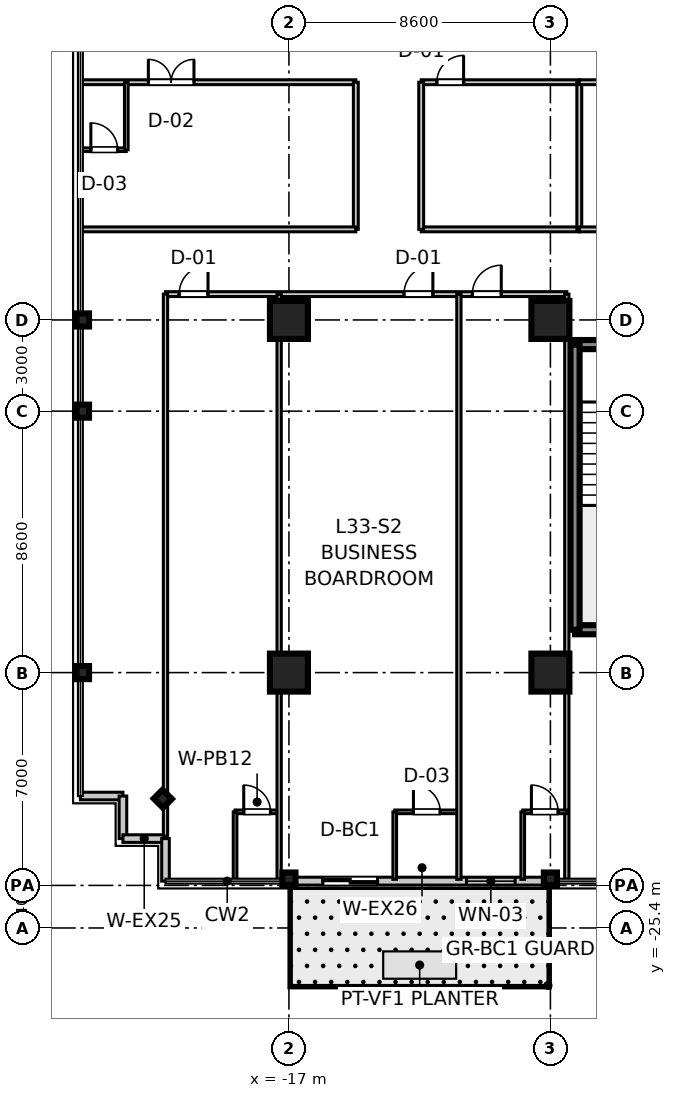
"""IFC4 building model, lengths in metres.
Left out: names, types, materials, properties, quantities, classifications, styles, units other than length and angle.
Written with IfcOpenShell. Run it as: python <this file> out.ifc"""

import sys

from ifc_helpers import new_model, si_unit, direction, frame, frame_2d, origin, origin_2d, place, context, subcontext, project, spatial, rectangle, i_section, extrude, source, transform, mapped, element, fill, save


model = new_model("IFC4")
c1 = context("Model", 3, precision=1e-05, world=origin(), true_north=direction((0.0, 1.0)))
c2 = subcontext(c1, "Body", "Model", "MODEL_VIEW")
j1 = project(units=[si_unit("LENGTHUNIT", "METRE"), si_unit("PLANEANGLEUNIT", "RADIAN")], contexts=[c1])
p1 = place(None, origin())
s1 = spatial("IfcSite", under=j1, at=p1, CompositionType="ELEMENT")
p2 = place(p1, origin())
s2 = spatial("IfcBuilding", under=s1, at=p2, CompositionType="ELEMENT")
p3 = place(p2, frame((0.0, 0.0, 132.1)))
s3 = spatial("IfcBuildingStorey", under=s2, at=p3, CompositionType="ELEMENT", Elevation=132.1)
m1 = source(origin(), c2, "Body", "SweptSolid", [
    extrude(rectangle(XDim=1.25, YDim=1.25, at=origin_2d()), origin(), (0.0, 0.0, 1.0), 3.605),
])
for number, where, z_axis, x_axis in (
    (1, (-17.0, -17.0, 0.0), (0.0, 0.0, 1.0), (1.0, 0.0, 0.0)),
    (2, (-17.0, -5.4, 0.0), (0.0, 0.0, 1.0), (1.0, 0.0, 0.0)),
    (3, (-8.4, -17.0, 0.0), (0.0, 0.0, 1.0), (1.0, 0.0, 0.0)),
    (4, (-8.4, -5.4, 0.0), (0.0, 0.0, 1.0), (1.0, 0.0, 0.0)),
):
    element("IfcColumn", number, at=place(p3, frame(where, z_axis=z_axis, x_axis=x_axis)), inside=s3, PredefinedType="COLUMN", context=c2, shape_type="MappedRepresentation", body=[
        mapped(m1, transform((0.0, 0.0, 0.0), scale=1.0)),
    ])
m2 = source(origin(), c2, "Body", "SweptSolid", [
    extrude(i_section(OverallWidth=0.409, OverallDepth=0.43, WebThickness=0.021, FlangeThickness=0.034, at=origin_2d()), origin(), (0.0, 0.0, 1.0), 3.605),
])
for number, where, z_axis, x_axis in (
    (5, (-23.78, -17.0, 0.0), (0.0, 0.0, 1.0), (1.0, 0.0, 0.0)),
    (6, (-23.78, -8.4, 0.0), (0.0, 0.0, 1.0), (1.0, 0.0, 0.0)),
    (7, (-23.78, -5.4, 0.0), (0.0, 0.0, 1.0), (1.0, 0.0, 0.0)),
    (8, (-17.0, -23.78, 0.0), (0.0, 0.0, 1.0), (0.0, 1.0, 0.0)),
    (9, (-8.4, -23.78, 0.0), (0.0, 0.0, 1.0), (0.0, 1.0, 0.0)),
    (10, (-21.15, -21.15, 0.0), (0.0, 0.0, 1.0), (0.707, 0.707, 0.0)),
):
    element("IfcColumn", number, at=place(p3, frame(where, z_axis=z_axis, x_axis=x_axis)), inside=s3, PredefinedType="COLUMN", context=c2, shape_type="MappedRepresentation", body=[
        mapped(m2, transform((0.0, 0.0, 0.0), scale=1.0)),
    ])
m3 = source(origin(), c2, "Body", "SweptSolid", [
    extrude(rectangle(XDim=3.98, YDim=0.3, at=frame_2d((1.99, 0.0))), origin(), (0.0, 0.0, 1.0), 3.38),
])
p4 = place(p3, frame((-7.59, -15.59, 0.0), z_axis=(0.0, 0.0, 1.0), x_axis=(1.0, 0.0, 0.0)))
e11 = element("IfcWall", 11, at=p4, inside=s3, PredefinedType="SHEAR", context=c2, shape_type="MappedRepresentation", body=[
    mapped(m3, transform((0.0, 0.0, 0.0), scale=1.0)),
])
p5 = place(p3, frame((-7.59, -6.21, 0.0), z_axis=(0.0, 0.0, 1.0), x_axis=(1.0, 0.0, 0.0)))
e12 = element("IfcWall", 12, at=p5, inside=s3, PredefinedType="SHEAR", context=c2, shape_type="MappedRepresentation", body=[
    mapped(m3, transform((0.0, 0.0, 0.0), scale=1.0)),
])
p6 = place(p5, frame((1.44, 0.0, 0.0)))
e13 = element("IfcOpeningElement", 13, at=p6, cuts=e12, PredefinedType="OPENING", context=c2, shape_type="SweptSolid", body=[
    extrude(rectangle(XDim=1.1, YDim=2.15, at=frame_2d((0.55, 1.075))), frame((0.0, 0.16, 0.0), z_axis=(0.0, -1.0, 0.0), x_axis=(1.0, 0.0, 0.0)), (0.0, 0.0, 1.0), 0.32),
])
m4 = source(origin(), c2, "Body", "SweptSolid", [
    extrude(rectangle(XDim=9.38, YDim=0.3, at=frame_2d((4.69, 0.0))), origin(), (0.0, 0.0, 1.0), 3.38),
])
p7 = place(p3, frame((-7.59, -15.59, 0.0), z_axis=(0.0, 0.0, 1.0), x_axis=(0.0, 1.0, 0.0)))
e14 = element("IfcWall", 14, at=p7, inside=s3, PredefinedType="SHEAR", context=c2, shape_type="MappedRepresentation", body=[
    mapped(m4, transform((0.0, 0.0, 0.0), scale=1.0)),
])
m5 = source(origin(), c2, "Body", "SweptSolid", [
    extrude(rectangle(XDim=1.4, YDim=0.25, at=frame_2d((0.7, 0.0))), origin(), (0.0, 0.0, 1.0), 3.38),
])
p8 = place(p3, frame((-23.86, -21.06, 0.0), z_axis=(0.0, 0.0, 1.0), x_axis=(1.0, 0.0, 0.0)))
e15 = element("IfcWall", 15, at=p8, inside=s3, PredefinedType="STANDARD", context=c2, shape_type="MappedRepresentation", body=[
    mapped(m5, transform((0.0, 0.0, 0.0), scale=1.0)),
])
m6 = source(origin(), c2, "Body", "SweptSolid", [
    extrude(rectangle(XDim=1.4, YDim=0.25, at=frame_2d((0.7, 0.0))), origin(), (0.0, 0.0, 1.0), 3.38),
])
for number, where, z_axis, x_axis in (
    (16, (-22.46, -22.46, 0.0), (0.0, 0.0, 1.0), (0.0, 1.0, 0.0)),
    (17, (-22.46, -22.46, 0.0), (0.0, 0.0, 1.0), (1.0, 0.0, 0.0)),
):
    element("IfcWall", number, at=place(p3, frame(where, z_axis=z_axis, x_axis=x_axis)), inside=s3, PredefinedType="STANDARD", context=c2, shape_type="MappedRepresentation", body=[
        mapped(m6, transform((0.0, 0.0, 0.0), scale=1.0)),
    ])
p9 = place(p3, frame((-21.06, -23.86, 0.0), z_axis=(0.0, 0.0, 1.0), x_axis=(0.0, 1.0, 0.0)))
e18 = element("IfcWall", 18, at=p9, inside=s3, PredefinedType="STANDARD", context=c2, shape_type="MappedRepresentation", body=[
    mapped(m5, transform((0.0, 0.0, 0.0), scale=1.0)),
])
m7 = source(origin(), c2, "Body", "SweptSolid", [
    extrude(rectangle(XDim=8.6, YDim=0.26, at=frame_2d((4.3, 0.0))), origin(), (0.0, 0.0, 1.0), 2.86),
])
p10 = place(p3, frame((-17.0, -23.86, 0.0), z_axis=(0.0, 0.0, 1.0), x_axis=(1.0, 0.0, 0.0)))
e19 = element("IfcWall", 19, at=p10, inside=s3, PredefinedType="STANDARD", context=c2, shape_type="MappedRepresentation", body=[
    mapped(m7, transform((0.0, 0.0, 0.0), scale=1.0)),
])
p11 = place(p10, frame((1.115, 0.0, 0.0)))
e20 = element("IfcOpeningElement", 20, at=p11, cuts=e19, PredefinedType="OPENING", context=c2, shape_type="SweptSolid", body=[
    extrude(rectangle(XDim=1.8, YDim=2.25, at=frame_2d((0.9, 1.125))), frame((0.0, 0.14, 0.0), z_axis=(0.0, -1.0, 0.0), x_axis=(1.0, 0.0, 0.0)), (0.0, 0.0, 1.0), 0.28),
])
p12 = place(p10, frame((5.84, 0.0, 0.85)))
e21 = element("IfcOpeningElement", 21, at=p12, cuts=e19, PredefinedType="OPENING", context=c2, shape_type="SweptSolid", body=[
    extrude(rectangle(XDim=1.6, YDim=1.8, at=frame_2d((0.8, 0.9))), frame((0.0, 0.14, 0.0), z_axis=(0.0, -1.0, 0.0), x_axis=(1.0, 0.0, 0.0)), (0.0, 0.0, 1.0), 0.28),
])
m8 = source(origin(), c2, "Body", "SweptSolid", [
    extrude(rectangle(XDim=13.2, YDim=0.16, at=frame_2d((6.6, 0.0))), origin(), (0.0, 0.0, 1.0), 2.72),
])
p13 = place(p3, frame((-21.06, -4.55, 0.0), z_axis=(0.0, 0.0, 1.0), x_axis=(1.0, 0.0, 0.0)))
e22 = element("IfcWall", 22, at=p13, inside=s3, PredefinedType="PARTITIONING", context=c2, shape_type="MappedRepresentation", body=[
    mapped(m8, transform((0.0, 0.0, 0.0), scale=1.0)),
])
p14 = place(p13, frame((0.448, 0.0, 0.0)))
e23 = element("IfcOpeningElement", 23, at=p14, cuts=e22, PredefinedType="OPENING", context=c2, shape_type="SweptSolid", body=[
    extrude(rectangle(XDim=0.95, YDim=2.1, at=frame_2d((0.475, 1.05))), frame((0.0, 0.09, 0.0), z_axis=(0.0, -1.0, 0.0), x_axis=(1.0, 0.0, 0.0)), (0.0, 0.0, 1.0), 0.18),
])
p15 = place(p13, frame((7.844, 0.0, 0.0)))
e24 = element("IfcOpeningElement", 24, at=p15, cuts=e22, PredefinedType="OPENING", context=c2, shape_type="SweptSolid", body=[
    extrude(rectangle(XDim=0.95, YDim=2.1, at=frame_2d((0.475, 1.05))), frame((0.0, 0.09, 0.0), z_axis=(0.0, -1.0, 0.0), x_axis=(1.0, 0.0, 0.0)), (0.0, 0.0, 1.0), 0.18),
])
p16 = place(p13, frame((10.094, 0.0, 0.0)))
e25 = element("IfcOpeningElement", 25, at=p16, cuts=e22, PredefinedType="OPENING", context=c2, shape_type="SweptSolid", body=[
    extrude(rectangle(XDim=0.95, YDim=2.1, at=frame_2d((0.475, 1.05))), frame((0.0, 0.09, 0.0), z_axis=(0.0, -1.0, 0.0), x_axis=(1.0, 0.0, 0.0)), (0.0, 0.0, 1.0), 0.18),
])
m9 = source(origin(), c2, "Body", "SweptSolid", [
    extrude(rectangle(XDim=17.83, YDim=0.14, at=frame_2d((8.915, 0.0))), origin(), (0.0, 0.0, 1.0), 2.72),
])
p17 = place(p3, frame((-21.06, -22.38, 0.0), z_axis=(0.0, 0.0, 1.0), x_axis=(0.0, 1.0, 0.0)))
e26 = element("IfcWall", 26, at=p17, inside=s3, PredefinedType="PARTITIONING", context=c2, shape_type="MappedRepresentation", body=[
    mapped(m9, transform((0.0, 0.0, 0.0), scale=1.0)),
])
m10 = source(origin(), c2, "Body", "SweptSolid", [
    extrude(rectangle(XDim=19.25, YDim=0.14, at=frame_2d((9.625, 0.0))), origin(), (0.0, 0.0, 1.0), 2.72),
])
p18 = place(p3, frame((-7.86, -23.8, 0.0), z_axis=(0.0, 0.0, 1.0), x_axis=(0.0, 1.0, 0.0)))
e27 = element("IfcWall", 27, at=p18, inside=s3, PredefinedType="PARTITIONING", context=c2, shape_type="MappedRepresentation", body=[
    mapped(m10, transform((0.0, 0.0, 0.0), scale=1.0)),
])
m11 = source(origin(), c2, "Body", "SweptSolid", [
    extrude(rectangle(XDim=1.45, YDim=0.12, at=frame_2d((0.725, 0.0))), origin(), (0.0, 0.0, 1.0), 2.72),
])
p19 = place(p3, frame((-18.772, -21.58, 0.0), z_axis=(0.0, 0.0, 1.0), x_axis=(1.0, 0.0, 0.0)))
e28 = element("IfcWall", 28, at=p19, inside=s3, PredefinedType="PARTITIONING", context=c2, shape_type="MappedRepresentation", body=[
    mapped(m11, transform((0.0, 0.0, 0.0), scale=1.0)),
])
p20 = place(p19, frame((0.285, 0.0, 0.0)))
e29 = element("IfcOpeningElement", 29, at=p20, cuts=e28, PredefinedType="OPENING", context=c2, shape_type="SweptSolid", body=[
    extrude(rectangle(XDim=0.88, YDim=2.1, at=frame_2d((0.44, 1.05))), frame((0.0, 0.07, 0.0), z_axis=(0.0, -1.0, 0.0), x_axis=(1.0, 0.0, 0.0)), (0.0, 0.0, 1.0), 0.14),
])
m12 = source(origin(), c2, "Body", "SweptSolid", [
    extrude(rectangle(XDim=2.22, YDim=0.12, at=frame_2d((1.11, 0.0))), origin(), (0.0, 0.0, 1.0), 2.72),
])
p21 = place(p3, frame((-18.772, -23.8, 0.0), z_axis=(0.0, 0.0, 1.0), x_axis=(0.0, 1.0, 0.0)))
e30 = element("IfcWall", 30, at=p21, inside=s3, PredefinedType="PARTITIONING", context=c2, shape_type="MappedRepresentation", body=[
    mapped(m12, transform((0.0, 0.0, 0.0), scale=1.0)),
])
p22 = place(p3, frame((-17.322, -23.8, 0.0), z_axis=(0.0, 0.0, 1.0), x_axis=(0.0, 1.0, 0.0)))
e31 = element("IfcWall", 31, at=p22, inside=s3, PredefinedType="PARTITIONING", context=c2, shape_type="MappedRepresentation", body=[
    mapped(m10, transform((0.0, 0.0, 0.0), scale=1.0)),
])
m13 = source(origin(), c2, "Body", "SweptSolid", [
    extrude(rectangle(XDim=2.11, YDim=0.12, at=frame_2d((1.055, 0.0))), origin(), (0.0, 0.0, 1.0), 2.72),
])
p23 = place(p3, frame((-13.52, -21.58, 0.0), z_axis=(0.0, 0.0, 1.0), x_axis=(1.0, 0.0, 0.0)))
e32 = element("IfcWall", 32, at=p23, inside=s3, PredefinedType="PARTITIONING", context=c2, shape_type="MappedRepresentation", body=[
    mapped(m13, transform((0.0, 0.0, 0.0), scale=1.0)),
])
p24 = place(p23, frame((0.615, 0.0, 0.0)))
e33 = element("IfcOpeningElement", 33, at=p24, cuts=e32, PredefinedType="OPENING", context=c2, shape_type="SweptSolid", body=[
    extrude(rectangle(XDim=0.88, YDim=2.1, at=frame_2d((0.44, 1.05))), frame((0.0, 0.07, 0.0), z_axis=(0.0, -1.0, 0.0), x_axis=(1.0, 0.0, 0.0)), (0.0, 0.0, 1.0), 0.14),
])
p25 = place(p3, frame((-13.52, -23.8, 0.0), z_axis=(0.0, 0.0, 1.0), x_axis=(0.0, 1.0, 0.0)))
e34 = element("IfcWall", 34, at=p25, inside=s3, PredefinedType="PARTITIONING", context=c2, shape_type="MappedRepresentation", body=[
    mapped(m12, transform((0.0, 0.0, 0.0), scale=1.0)),
])
p26 = place(p3, frame((-11.41, -23.8, 0.0), z_axis=(0.0, 0.0, 1.0), x_axis=(0.0, 1.0, 0.0)))
e35 = element("IfcWall", 35, at=p26, inside=s3, PredefinedType="PARTITIONING", context=c2, shape_type="MappedRepresentation", body=[
    mapped(m10, transform((0.0, 0.0, 0.0), scale=1.0)),
])
p27 = place(p3, frame((-9.31, -21.58, 0.0), z_axis=(0.0, 0.0, 1.0), x_axis=(1.0, 0.0, 0.0)))
e36 = element("IfcWall", 36, at=p27, inside=s3, PredefinedType="PARTITIONING", context=c2, shape_type="MappedRepresentation", body=[
    mapped(m11, transform((0.0, 0.0, 0.0), scale=1.0)),
])
p28 = place(p27, frame((0.285, 0.0, 0.0)))
e37 = element("IfcOpeningElement", 37, at=p28, cuts=e36, PredefinedType="OPENING", context=c2, shape_type="SweptSolid", body=[
    extrude(rectangle(XDim=0.88, YDim=2.1, at=frame_2d((0.44, 1.05))), frame((0.0, 0.07, 0.0), z_axis=(0.0, -1.0, 0.0), x_axis=(1.0, 0.0, 0.0)), (0.0, 0.0, 1.0), 0.14),
])
p29 = place(p3, frame((-9.31, -23.8, 0.0), z_axis=(0.0, 0.0, 1.0), x_axis=(0.0, 1.0, 0.0)))
e38 = element("IfcWall", 38, at=p29, inside=s3, PredefinedType="PARTITIONING", context=c2, shape_type="MappedRepresentation", body=[
    mapped(m12, transform((0.0, 0.0, 0.0), scale=1.0)),
])
m14 = source(origin(), c2, "Body", "SweptSolid", [
    extrude(rectangle(XDim=9.0, YDim=0.16, at=frame_2d((4.5, 0.0))), origin(), (0.0, 0.0, 1.0), 2.72),
])
p30 = place(p3, frame((-23.8, 2.42, 0.0), z_axis=(0.0, 0.0, 1.0), x_axis=(1.0, 0.0, 0.0)))
e39 = element("IfcWall", 39, at=p30, inside=s3, PredefinedType="PARTITIONING", context=c2, shape_type="MappedRepresentation", body=[
    mapped(m14, transform((0.0, 0.0, 0.0), scale=1.0)),
])
p31 = place(p30, frame((2.176, 0.0, 0.0)))
e40 = element("IfcOpeningElement", 40, at=p31, cuts=e39, PredefinedType="OPENING", context=c2, shape_type="SweptSolid", body=[
    extrude(rectangle(XDim=1.5, YDim=2.15, at=frame_2d((0.75, 1.075))), frame((0.0, 0.09, 0.0), z_axis=(0.0, -1.0, 0.0), x_axis=(1.0, 0.0, 0.0)), (0.0, 0.0, 1.0), 0.18),
])
m15 = source(origin(), c2, "Body", "SweptSolid", [
    extrude(rectangle(XDim=4.84, YDim=0.16, at=frame_2d((2.42, 0.0))), origin(), (0.0, 0.0, 1.0), 2.72),
])
p32 = place(p3, frame((-14.8, -2.42, 0.0), z_axis=(0.0, 0.0, 1.0), x_axis=(0.0, 1.0, 0.0)))
e41 = element("IfcWall", 41, at=p32, inside=s3, PredefinedType="PARTITIONING", context=c2, shape_type="MappedRepresentation", body=[
    mapped(m15, transform((0.0, 0.0, 0.0), scale=1.0)),
])
p33 = place(p3, frame((-23.8, -2.42, 0.0), z_axis=(0.0, 0.0, 1.0), x_axis=(1.0, 0.0, 0.0)))
e42 = element("IfcWall", 42, at=p33, inside=s3, PredefinedType="PARTITIONING", context=c2, shape_type="MappedRepresentation", body=[
    mapped(m14, transform((0.0, 0.0, 0.0), scale=1.0)),
])
p34 = place(p3, frame((-23.8, 0.2, 0.0), z_axis=(0.0, 0.0, 1.0), x_axis=(1.0, 0.0, 0.0)))
e43 = element("IfcWall", 43, at=p34, inside=s3, PredefinedType="PARTITIONING", context=c2, shape_type="MappedRepresentation", body=[
    mapped(m11, transform((0.0, 0.0, 0.0), scale=1.0)),
])
p35 = place(p34, frame((0.285, 0.0, 0.0)))
e44 = element("IfcOpeningElement", 44, at=p35, cuts=e43, PredefinedType="OPENING", context=c2, shape_type="SweptSolid", body=[
    extrude(rectangle(XDim=0.88, YDim=2.1, at=frame_2d((0.44, 1.05))), frame((0.0, 0.07, 0.0), z_axis=(0.0, -1.0, 0.0), x_axis=(1.0, 0.0, 0.0)), (0.0, 0.0, 1.0), 0.14),
])
p36 = place(p3, frame((-22.35, 0.2, 0.0), z_axis=(0.0, 0.0, 1.0), x_axis=(0.0, 1.0, 0.0)))
e45 = element("IfcWall", 45, at=p36, inside=s3, PredefinedType="PARTITIONING", context=c2, shape_type="MappedRepresentation", body=[
    mapped(m12, transform((0.0, 0.0, 0.0), scale=1.0)),
])
m16 = source(origin(), c2, "Body", "SweptSolid", [
    extrude(rectangle(XDim=5.2, YDim=0.16, at=frame_2d((2.6, 0.0))), origin(), (0.0, 0.0, 1.0), 2.72),
])
p37 = place(p3, frame((-12.65, -2.42, 0.0), z_axis=(0.0, 0.0, 1.0), x_axis=(1.0, 0.0, 0.0)))
e46 = element("IfcWall", 46, at=p37, inside=s3, PredefinedType="PARTITIONING", context=c2, shape_type="MappedRepresentation", body=[
    mapped(m16, transform((0.0, 0.0, 0.0), scale=1.0)),
])
p38 = place(p3, frame((-12.65, 2.42, 0.0), z_axis=(0.0, 0.0, 1.0), x_axis=(1.0, 0.0, 0.0)))
e47 = element("IfcWall", 47, at=p38, inside=s3, PredefinedType="PARTITIONING", context=c2, shape_type="MappedRepresentation", body=[
    mapped(m16, transform((0.0, 0.0, 0.0), scale=1.0)),
])
p39 = place(p38, frame((0.515, 0.0, 0.0)))
e48 = element("IfcOpeningElement", 48, at=p39, cuts=e47, PredefinedType="OPENING", context=c2, shape_type="SweptSolid", body=[
    extrude(rectangle(XDim=0.88, YDim=2.1, at=frame_2d((0.44, 1.05))), frame((0.0, 0.09, 0.0), z_axis=(0.0, -1.0, 0.0), x_axis=(1.0, 0.0, 0.0)), (0.0, 0.0, 1.0), 0.18),
])
for number, where, z_axis, x_axis in (
    (49, (-12.65, -2.42, 0.0), (0.0, 0.0, 1.0), (0.0, 1.0, 0.0)),
    (50, (-7.45, -2.42, 0.0), (0.0, 0.0, 1.0), (0.0, 1.0, 0.0)),
):
    element("IfcWall", number, at=place(p3, frame(where, z_axis=z_axis, x_axis=x_axis)), inside=s3, PredefinedType="PARTITIONING", context=c2, shape_type="MappedRepresentation", body=[
        mapped(m15, transform((0.0, 0.0, 0.0), scale=1.0)),
    ])
p40 = place(p3, frame((-7.45, -2.42, 0.0), z_axis=(0.0, 0.0, 1.0), x_axis=(1.0, 0.0, 0.0)))
e51 = element("IfcWall", 51, at=p40, inside=s3, PredefinedType="PARTITIONING", context=c2, shape_type="MappedRepresentation", body=[
    mapped(m16, transform((0.0, 0.0, 0.0), scale=1.0)),
])
p41 = place(p40, frame((1.412, 0.0, 0.0)))
e52 = element("IfcOpeningElement", 52, at=p41, cuts=e51, PredefinedType="OPENING", context=c2, shape_type="SweptSolid", body=[
    extrude(rectangle(XDim=0.88, YDim=2.1, at=frame_2d((0.44, 1.05))), frame((0.0, 0.09, 0.0), z_axis=(0.0, -1.0, 0.0), x_axis=(1.0, 0.0, 0.0)), (0.0, 0.0, 1.0), 0.18),
])
p42 = place(p3, frame((-7.45, 2.42, 0.0), z_axis=(0.0, 0.0, 1.0), x_axis=(1.0, 0.0, 0.0)))
e53 = element("IfcWall", 53, at=p42, inside=s3, PredefinedType="PARTITIONING", context=c2, shape_type="MappedRepresentation", body=[
    mapped(m16, transform((0.0, 0.0, 0.0), scale=1.0)),
])
m17 = source(origin(), c2, "Body", "SweptSolid", [
    extrude(rectangle(XDim=0.88, YDim=2.1, at=frame_2d((0.44, 1.05))), frame((0.0, 0.025, 0.0), z_axis=(0.0, -1.0, 0.0), x_axis=(1.0, 0.0, 0.0)), (0.0, 0.0, 1.0), 0.05),
])
p43 = place(p20, frame((0.88, 0.0, 0.0), z_axis=(0.0, 0.0, 1.0), x_axis=(-1.0, 0.0, 0.0)))
e54 = element("IfcDoor", 54, at=p43, inside=s3, OperationType="SINGLE_SWING_LEFT", PredefinedType="DOOR", context=c2, shape_type="MappedRepresentation", body=[
    mapped(m17, transform((0.0, 0.0, 0.0), scale=1.0)),
])
fill(e29, e54)
m18 = source(origin(), c2, "Body", "SweptSolid", [
    extrude(rectangle(XDim=0.95, YDim=2.1, at=frame_2d((0.475, 1.05))), frame((0.0, 0.025, 0.0), z_axis=(0.0, -1.0, 0.0), x_axis=(1.0, 0.0, 0.0)), (0.0, 0.0, 1.0), 0.05),
])
p44 = place(p14, frame((0.95, 0.0, 0.0), z_axis=(0.0, 0.0, 1.0), x_axis=(-1.0, 0.0, 0.0)))
e55 = element("IfcDoor", 55, at=p44, inside=s3, OperationType="SINGLE_SWING_RIGHT", PredefinedType="DOOR", context=c2, shape_type="MappedRepresentation", body=[
    mapped(m18, transform((0.0, 0.0, 0.0), scale=1.0)),
])
fill(e23, e55)
p45 = place(p24, frame((0.88, 0.0, 0.0), z_axis=(0.0, 0.0, 1.0), x_axis=(-1.0, 0.0, 0.0)))
e56 = element("IfcDoor", 56, at=p45, inside=s3, OperationType="SINGLE_SWING_LEFT", PredefinedType="DOOR", context=c2, shape_type="MappedRepresentation", body=[
    mapped(m17, transform((0.0, 0.0, 0.0), scale=1.0)),
])
fill(e33, e56)
p46 = place(p15, frame((0.95, 0.0, 0.0), z_axis=(0.0, 0.0, 1.0), x_axis=(-1.0, 0.0, 0.0)))
e57 = element("IfcDoor", 57, at=p46, inside=s3, OperationType="SINGLE_SWING_RIGHT", PredefinedType="DOOR", context=c2, shape_type="MappedRepresentation", body=[
    mapped(m18, transform((0.0, 0.0, 0.0), scale=1.0)),
])
fill(e24, e57)
p47 = place(p28, frame((0.88, 0.0, 0.0), z_axis=(0.0, 0.0, 1.0), x_axis=(-1.0, 0.0, 0.0)))
e58 = element("IfcDoor", 58, at=p47, inside=s3, OperationType="SINGLE_SWING_LEFT", PredefinedType="DOOR", context=c2, shape_type="MappedRepresentation", body=[
    mapped(m17, transform((0.0, 0.0, 0.0), scale=1.0)),
])
fill(e37, e58)
p48 = place(p16, frame((0.95, 0.0, 0.0), z_axis=(0.0, 0.0, 1.0), x_axis=(-1.0, 0.0, 0.0)))
e59 = element("IfcDoor", 59, at=p48, inside=s3, OperationType="SINGLE_SWING_RIGHT", PredefinedType="DOOR", context=c2, shape_type="MappedRepresentation", body=[
    mapped(m18, transform((0.0, 0.0, 0.0), scale=1.0)),
])
fill(e25, e59)
p49 = place(p35, origin())
e60 = element("IfcDoor", 60, at=p49, inside=s3, OperationType="SINGLE_SWING_LEFT", PredefinedType="DOOR", context=c2, shape_type="MappedRepresentation", body=[
    mapped(m17, transform((0.0, 0.0, 0.0), scale=1.0)),
])
fill(e44, e60)
m19 = source(origin(), c2, "Body", "SweptSolid", [
    extrude(rectangle(XDim=1.5, YDim=2.15, at=frame_2d((0.75, 1.075))), frame((0.0, 0.025, 0.0), z_axis=(0.0, -1.0, 0.0), x_axis=(1.0, 0.0, 0.0)), (0.0, 0.0, 1.0), 0.05),
])
p50 = place(p31, origin())
e61 = element("IfcDoor", 61, at=p50, inside=s3, OperationType="DOUBLE_DOOR_SINGLE_SWING", PredefinedType="DOOR", context=c2, shape_type="MappedRepresentation", body=[
    mapped(m19, transform((0.0, 0.0, 0.0), scale=1.0)),
])
fill(e40, e61)
p51 = place(p39, frame((0.88, 0.0, 0.0), z_axis=(0.0, 0.0, 1.0), x_axis=(-1.0, 0.0, 0.0)))
e62 = element("IfcDoor", 62, at=p51, inside=s3, OperationType="SINGLE_SWING_RIGHT", PredefinedType="DOOR", context=c2, shape_type="MappedRepresentation", body=[
    mapped(m17, transform((0.0, 0.0, 0.0), scale=1.0)),
])
fill(e48, e62)
m20 = source(origin(), c2, "Body", "SweptSolid", [
    extrude(rectangle(XDim=1.8, YDim=2.25, at=frame_2d((0.9, 1.125))), frame((0.0, 0.025, 0.0), z_axis=(0.0, -1.0, 0.0), x_axis=(1.0, 0.0, 0.0)), (0.0, 0.0, 1.0), 0.05),
])
p52 = place(p11, frame((1.8, 0.0, 0.0), z_axis=(0.0, 0.0, 1.0), x_axis=(-1.0, 0.0, 0.0)))
e63 = element("IfcDoor", 63, at=p52, inside=s3, OperationType="DOUBLE_DOOR_SLIDING", PredefinedType="DOOR", context=c2, shape_type="MappedRepresentation", body=[
    mapped(m20, transform((0.0, 0.0, 0.0), scale=1.0)),
])
fill(e20, e63)
m21 = source(origin(), c2, "Body", "SweptSolid", [
    extrude(rectangle(XDim=1.6, YDim=1.8, at=frame_2d((0.8, 0.9))), frame((0.0, 0.03, 0.0), z_axis=(0.0, -1.0, 0.0), x_axis=(1.0, 0.0, 0.0)), (0.0, 0.0, 1.0), 0.06),
])
p53 = place(p12, origin())
e64 = element("IfcWindow", 64, at=p53, inside=s3, PartitioningType="SINGLE_PANEL", PredefinedType="WINDOW", context=c2, shape_type="MappedRepresentation", body=[
    mapped(m21, transform((0.0, 0.0, 0.0), scale=1.0)),
])
fill(e21, e64)
save(model, sys.argv[1])
